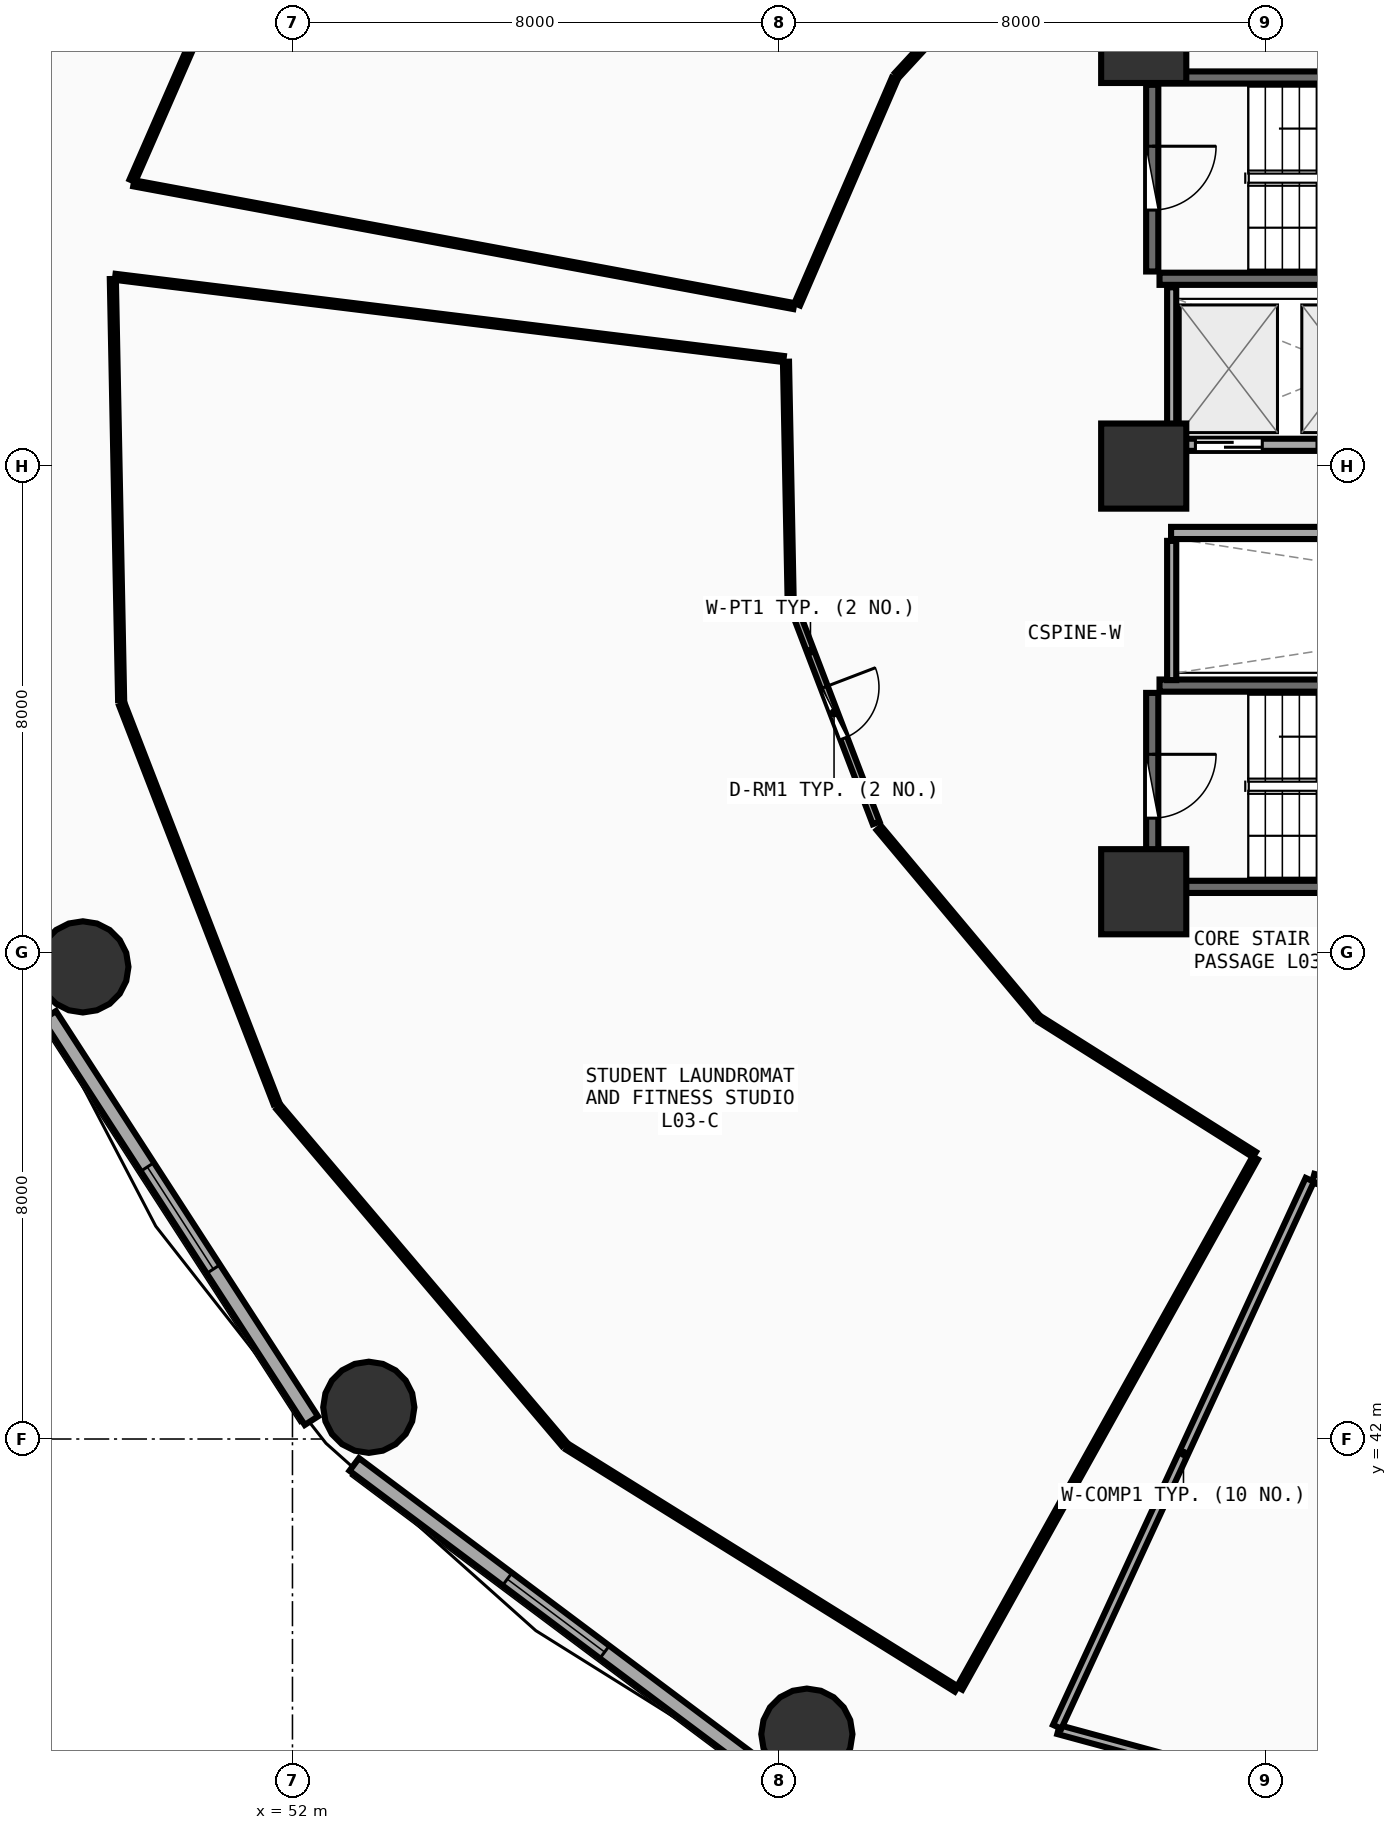
"""IFC4 building model, lengths in metres.
Left out: names, types, materials, properties, quantities, classifications, styles, units other than length and angle.
Written with IfcOpenShell. Run it as: python <this file> out.ifc"""

import sys

from ifc_helpers import new_model, si_unit, direction, frame, frame_2d, origin, origin_2d, place, context, subcontext, project, spatial, rectangle, circle, extrude, element, fill, save


model = new_model("IFC4")
c1 = context("Model", 3, precision=1e-05, world=origin(), true_north=direction((0.0, 1.0)))
c2 = subcontext(c1, "Body", "Model", "MODEL_VIEW")
j1 = project(units=[si_unit("LENGTHUNIT", "METRE"), si_unit("PLANEANGLEUNIT", "RADIAN")], contexts=[c1])
p1 = place(None, origin())
s1 = spatial("IfcSite", under=j1, at=p1, CompositionType="ELEMENT")
p2 = place(p1, origin())
s2 = spatial("IfcBuilding", under=s1, at=p2, CompositionType="ELEMENT")
p3 = place(p2, frame((0.0, 0.0, 13.5)))
s3 = spatial("IfcBuildingStorey", under=s2, at=p3, CompositionType="ELEMENT", Elevation=13.5)
for number, where, z_axis, x_axis in (
    (1, (66.0, 51.0, 0.0), (0.0, 0.0, 1.0), (1.0, 0.0, 0.0)),
    (2, (66.0, 65.0, 0.0), (0.0, 0.0, 1.0), (1.0, 0.0, 0.0)),
    (3, (66.0, 58.0, 0.0), (0.0, 0.0, 1.0), (1.0, 0.0, 0.0)),
):
    element("IfcColumn", number, at=place(p3, frame(where, z_axis=z_axis, x_axis=x_axis)), inside=s3, PredefinedType="PILASTER", context=c2, shape_type="SweptSolid", body=[
        extrude(rectangle(XDim=1.4, YDim=1.4, at=origin_2d()), origin(), (0.0, 0.0, 1.0), 4.5),
    ])
for number, where, z_axis, x_axis in (
    (4, (48.553, 49.764, 0.0), (0.0, 0.0, 1.0), (1.0, 0.0, 0.0)),
    (5, (53.256, 42.522, 0.0), (0.0, 0.0, 1.0), (1.0, 0.0, 0.0)),
    (6, (60.46, 37.146, 0.0), (0.0, 0.0, 1.0), (1.0, 0.0, 0.0)),
):
    element("IfcColumn", number, at=place(p3, frame(where, z_axis=z_axis, x_axis=x_axis)), inside=s3, PredefinedType="COLUMN", context=c2, shape_type="SweptSolid", body=[
        extrude(circle(Radius=0.75, at=origin_2d()), origin(), (0.0, 0.0, 1.0), 4.5),
    ])
p4 = place(p3, frame((48.001, 48.967, 0.0), z_axis=(0.0, 0.0, 1.0), x_axis=(0.543005114258, -0.839729388488, 0.0)))
e7 = element("IfcWall", 7, at=p4, inside=s3, PredefinedType="SOLIDWALL", context=c2, shape_type="SweptSolid", body=[
    extrude(rectangle(XDim=7.938, YDim=0.26, at=frame_2d((3.969, 0.0))), origin(), (0.0, 0.0, 1.0), 4.085),
])
p5 = place(p4, frame((2.969, 0.0, 0.85)))
e8 = element("IfcOpeningElement", 8, at=p5, cuts=e7, PredefinedType="OPENING", context=c2, shape_type="SweptSolid", body=[
    extrude(rectangle(XDim=2.0, YDim=1.75, at=frame_2d((1.0, 0.875))), frame((0.0, 0.14, 0.0), z_axis=(0.0, -1.0, 0.0), x_axis=(1.0, 0.0, 0.0)), (0.0, 0.0, 1.0), 0.28),
])
p6 = place(p3, frame((53.016, 41.582, 0.0), z_axis=(0.0, 0.0, 1.0), x_axis=(0.80030733173, -0.599590005569, 0.0)))
e9 = element("IfcWall", 9, at=p6, inside=s3, PredefinedType="SOLIDWALL", context=c2, shape_type="SweptSolid", body=[
    extrude(rectangle(XDim=8.291, YDim=0.26, at=frame_2d((4.145, 0.0))), origin(), (0.0, 0.0, 1.0), 4.085),
])
p7 = place(p6, frame((3.145, 0.0, 0.85)))
e10 = element("IfcOpeningElement", 10, at=p7, cuts=e9, PredefinedType="OPENING", context=c2, shape_type="SweptSolid", body=[
    extrude(rectangle(XDim=2.0, YDim=1.75, at=frame_2d((1.0, 0.875))), frame((0.0, 0.14, 0.0), z_axis=(0.0, -1.0, 0.0), x_axis=(1.0, 0.0, 0.0)), (0.0, 0.0, 1.0), 0.28),
])
for number, where, z_axis, x_axis in (
    (11, (66.26, 61.08, 0.0), (0.0, 0.0, 1.0), (1.0, 0.0, 0.0)),
    (12, (73.42, 64.39, 0.0), (0.0, 0.0, 1.0), (-1.0, 0.0, 0.0)),
):
    element("IfcWall", number, at=place(p3, frame(where, z_axis=z_axis, x_axis=x_axis)), inside=s3, PredefinedType="SHEAR", context=c2, shape_type="SweptSolid", body=[
        extrude(rectangle(XDim=7.16, YDim=0.2, at=frame_2d((3.58, 0.0))), origin(), (0.0, 0.0, 1.0), 4.1),
    ])
p8 = place(p3, frame((66.14, 64.27, 0.0), z_axis=(0.0, 0.0, 1.0), x_axis=(0.0, -1.0, 0.0)))
e13 = element("IfcWall", 13, at=p8, inside=s3, PredefinedType="SHEAR", context=c2, shape_type="SweptSolid", body=[
    extrude(rectangle(XDim=3.07, YDim=0.2, at=frame_2d((1.535, 0.0))), origin(), (0.0, 0.0, 1.0), 4.1),
])
p9 = place(p8, frame((1.01, 0.0, 0.0)))
e14 = element("IfcOpeningElement", 14, at=p9, cuts=e13, PredefinedType="OPENING", context=c2, shape_type="SweptSolid", body=[
    extrude(rectangle(XDim=1.05, YDim=2.1, at=frame_2d((0.525, 1.05))), frame((0.0, 0.11, 0.0), z_axis=(0.0, -1.0, 0.0), x_axis=(1.0, 0.0, 0.0)), (0.0, 0.0, 1.0), 0.22),
])
for number, where, z_axis, x_axis in (
    (15, (66.26, 51.08, 0.0), (0.0, 0.0, 1.0), (1.0, 0.0, 0.0)),
    (16, (73.42, 54.39, 0.0), (0.0, 0.0, 1.0), (-1.0, 0.0, 0.0)),
):
    element("IfcWall", number, at=place(p3, frame(where, z_axis=z_axis, x_axis=x_axis)), inside=s3, PredefinedType="SHEAR", context=c2, shape_type="SweptSolid", body=[
        extrude(rectangle(XDim=7.16, YDim=0.2, at=frame_2d((3.58, 0.0))), origin(), (0.0, 0.0, 1.0), 4.1),
    ])
p10 = place(p3, frame((66.14, 54.27, 0.0), z_axis=(0.0, 0.0, 1.0), x_axis=(0.0, -1.0, 0.0)))
e17 = element("IfcWall", 17, at=p10, inside=s3, PredefinedType="SHEAR", context=c2, shape_type="SweptSolid", body=[
    extrude(rectangle(XDim=3.07, YDim=0.2, at=frame_2d((1.535, 0.0))), origin(), (0.0, 0.0, 1.0), 4.1),
])
p11 = place(p10, frame((1.01, 0.0, 0.0)))
e18 = element("IfcOpeningElement", 18, at=p11, cuts=e17, PredefinedType="OPENING", context=c2, shape_type="SweptSolid", body=[
    extrude(rectangle(XDim=1.05, YDim=2.1, at=frame_2d((0.525, 1.05))), frame((0.0, 0.11, 0.0), z_axis=(0.0, -1.0, 0.0), x_axis=(1.0, 0.0, 0.0)), (0.0, 0.0, 1.0), 0.22),
])
p12 = place(p3, frame((66.45, 58.35, 0.0), z_axis=(0.0, 0.0, 1.0), x_axis=(1.0, 0.0, 0.0)))
e19 = element("IfcWall", 19, at=p12, inside=s3, PredefinedType="SOLIDWALL", context=c2, shape_type="SweptSolid", body=[
    extrude(rectangle(XDim=6.0, YDim=0.2, at=frame_2d((3.0, 0.0))), origin(), (0.0, 0.0, 1.0), 4.09),
])
p13 = place(p12, frame((0.4, 0.0, 0.0)))
e20 = element("IfcOpeningElement", 20, at=p13, cuts=e19, PredefinedType="OPENING", context=c2, shape_type="SweptSolid", body=[
    extrude(rectangle(XDim=1.1, YDim=2.1, at=frame_2d((0.55, 1.05))), frame((0.0, 0.11, 0.0), z_axis=(0.0, -1.0, 0.0), x_axis=(1.0, 0.0, 0.0)), (0.0, 0.0, 1.0), 0.22),
])
p14 = place(p12, frame((2.4, 0.0, 0.0)))
e21 = element("IfcOpeningElement", 21, at=p14, cuts=e19, PredefinedType="OPENING", context=c2, shape_type="SweptSolid", body=[
    extrude(rectangle(XDim=1.1, YDim=2.1, at=frame_2d((0.55, 1.05))), frame((0.0, 0.11, 0.0), z_axis=(0.0, -1.0, 0.0), x_axis=(1.0, 0.0, 0.0)), (0.0, 0.0, 1.0), 0.22),
])
p15 = place(p12, frame((4.4, 0.0, 0.0)))
e22 = element("IfcOpeningElement", 22, at=p15, cuts=e19, PredefinedType="OPENING", context=c2, shape_type="SweptSolid", body=[
    extrude(rectangle(XDim=1.1, YDim=2.1, at=frame_2d((0.55, 1.05))), frame((0.0, 0.11, 0.0), z_axis=(0.0, -1.0, 0.0), x_axis=(1.0, 0.0, 0.0)), (0.0, 0.0, 1.0), 0.22),
])
p16 = place(p3, frame((66.46, 58.48, 0.0), z_axis=(0.0, 0.0, 1.0), x_axis=(0.0, 1.0, 0.0)))
e23 = element("IfcWall", 23, at=p16, inside=s3, PredefinedType="PARTITIONING", context=c2, shape_type="SweptSolid", body=[
    extrude(rectangle(XDim=2.46, YDim=0.15, at=frame_2d((1.23, 0.0))), origin(), (0.0, 0.0, 1.0), 4.09),
])
p17 = place(p3, frame((66.45, 56.9, 0.0), z_axis=(0.0, 0.0, 1.0), x_axis=(1.0, 0.0, 0.0)))
e24 = element("IfcWall", 24, at=p17, inside=s3, PredefinedType="SOLIDWALL", context=c2, shape_type="SweptSolid", body=[
    extrude(rectangle(XDim=14.4, YDim=0.2, at=frame_2d((7.2, 0.0))), origin(), (0.0, 0.0, 1.0), 4.09),
])
p18 = place(p3, frame((66.46, 54.48, 0.0), z_axis=(0.0, 0.0, 1.0), x_axis=(0.0, 1.0, 0.0)))
e25 = element("IfcWall", 25, at=p18, inside=s3, PredefinedType="PARTITIONING", context=c2, shape_type="SweptSolid", body=[
    extrude(rectangle(XDim=2.29, YDim=0.15, at=frame_2d((1.145, 0.0))), origin(), (0.0, 0.0, 1.0), 4.09),
])
p19 = place(p3, frame((60.214, 55.753, 0.0), z_axis=(0.0, 0.0, 1.0), x_axis=(0.357236014767, -0.934014148583, 0.0)))
e26 = element("IfcWall", 26, at=p19, inside=s3, PredefinedType="PARTITIONING", context=c2, shape_type="SweptSolid", body=[
    extrude(rectangle(XDim=3.878, YDim=0.12, at=frame_2d((1.939, 0.0))), origin(), (0.0, 0.0, 1.0), 4.09),
])
p20 = place(p19, frame((1.489, 0.0, 0.0)))
e27 = element("IfcOpeningElement", 27, at=p20, cuts=e26, PredefinedType="OPENING", context=c2, shape_type="SweptSolid", body=[
    extrude(rectangle(XDim=0.9, YDim=2.08, at=frame_2d((0.45, 1.04))), frame((0.0, 0.07, 0.0), z_axis=(0.0, -1.0, 0.0), x_axis=(1.0, 0.0, 0.0)), (0.0, 0.0, 1.0), 0.14),
])
p21 = place(p3, frame((64.775, 67.495, 0.0), z_axis=(0.0, 0.0, 1.0), x_axis=(-0.678666938136, -0.734446177116, 0.0)))
e28 = element("IfcWall", 28, at=p21, inside=s3, PredefinedType="PARTITIONING", context=c2, shape_type="SweptSolid", body=[
    extrude(rectangle(XDim=4.167, YDim=0.1, at=frame_2d((2.083, 0.0))), origin(), (0.0, 0.0, 1.0), 3.485),
])
p22 = place(p3, frame((61.904, 64.368, 0.0), z_axis=(0.0, 0.0, 1.0), x_axis=(-0.396638629538, -0.917974834927, 0.0)))
e29 = element("IfcWall", 29, at=p22, inside=s3, PredefinedType="PARTITIONING", context=c2, shape_type="SweptSolid", body=[
    extrude(rectangle(XDim=4.039, YDim=0.1, at=frame_2d((2.02, 0.0))), origin(), (0.0, 0.0, 1.0), 4.09),
])
p23 = place(p3, frame((60.247, 60.631, 0.0), z_axis=(0.0, 0.0, 1.0), x_axis=(-0.98315361887, 0.18278118531, 0.0)))
e30 = element("IfcWall", 30, at=p23, inside=s3, PredefinedType="PARTITIONING", context=c2, shape_type="SweptSolid", body=[
    extrude(rectangle(XDim=11.042, YDim=0.1, at=frame_2d((5.521, 0.0))), origin(), (0.0, 0.0, 1.0), 3.785),
])
p24 = place(p3, frame((49.367, 62.694, 0.0), z_axis=(0.0, 0.0, 1.0), x_axis=(0.400764042692, 0.916181304156, 0.0)))
e31 = element("IfcWall", 31, at=p24, inside=s3, PredefinedType="PARTITIONING", context=c2, shape_type="SweptSolid", body=[
    extrude(rectangle(XDim=7.246, YDim=0.1, at=frame_2d((3.623, 0.0))), origin(), (0.0, 0.0, 1.0), 3.485),
])
p25 = place(p3, frame((60.117, 59.716, 0.0), z_axis=(0.0, 0.0, 1.0), x_axis=(0.01950509597, -0.999809757519, 0.0)))
e32 = element("IfcWall", 32, at=p25, inside=s3, PredefinedType="PARTITIONING", context=c2, shape_type="SweptSolid", body=[
    extrude(rectangle(XDim=3.868, YDim=0.1, at=frame_2d((1.934, 0.0))), origin(), (0.0, 0.0, 1.0), 3.485),
])
p26 = place(p3, frame((61.647, 52.044, 0.0), z_axis=(0.0, 0.0, 1.0), x_axis=(0.641987153188, -0.766715393834, 0.0)))
e33 = element("IfcWall", 33, at=p26, inside=s3, PredefinedType="PARTITIONING", context=c2, shape_type="SweptSolid", body=[
    extrude(rectangle(XDim=4.032, YDim=0.1, at=frame_2d((2.016, 0.0))), origin(), (0.0, 0.0, 1.0), 3.485),
])
p27 = place(p3, frame((64.295, 48.901, 0.0), z_axis=(0.0, 0.0, 1.0), x_axis=(0.845938242176, -0.533280873859, 0.0)))
e34 = element("IfcWall", 34, at=p27, inside=s3, PredefinedType="PARTITIONING", context=c2, shape_type="SweptSolid", body=[
    extrude(rectangle(XDim=4.167, YDim=0.1, at=frame_2d((2.084, 0.0))), origin(), (0.0, 0.0, 1.0), 3.485),
])
p28 = place(p3, frame((67.834, 46.622, 0.0), z_axis=(0.0, 0.0, 1.0), x_axis=(-0.486981509144, -0.873412279368, 0.0)))
e35 = element("IfcWall", 35, at=p28, inside=s3, PredefinedType="PARTITIONING", context=c2, shape_type="SweptSolid", body=[
    extrude(rectangle(XDim=9.984, YDim=0.1, at=frame_2d((4.992, 0.0))), origin(), (0.0, 0.0, 1.0), 3.485),
])
p29 = place(p3, frame((62.919, 37.888, 0.0), z_axis=(0.0, 0.0, 1.0), x_axis=(-0.848946333049, 0.52847906638, 0.0)))
e36 = element("IfcWall", 36, at=p29, inside=s3, PredefinedType="PARTITIONING", context=c2, shape_type="SweptSolid", body=[
    extrude(rectangle(XDim=7.527, YDim=0.1, at=frame_2d((3.763, 0.0))), origin(), (0.0, 0.0, 1.0), 3.485),
])
p30 = place(p3, frame((56.469, 41.917, 0.0), z_axis=(0.0, 0.0, 1.0), x_axis=(-0.646640152026, 0.762795197801, 0.0)))
e37 = element("IfcWall", 37, at=p30, inside=s3, PredefinedType="PARTITIONING", context=c2, shape_type="SweptSolid", body=[
    extrude(rectangle(XDim=7.258, YDim=0.1, at=frame_2d((3.629, 0.0))), origin(), (0.0, 0.0, 1.0), 3.485),
])
p31 = place(p3, frame((51.736, 47.521, 0.0), z_axis=(0.0, 0.0, 1.0), x_axis=(-0.361243648686, 0.932471461378, 0.0)))
e38 = element("IfcWall", 38, at=p31, inside=s3, PredefinedType="PARTITIONING", context=c2, shape_type="SweptSolid", body=[
    extrude(rectangle(XDim=7.026, YDim=0.1, at=frame_2d((3.513, 0.0))), origin(), (0.0, 0.0, 1.0), 3.485),
])
p32 = place(p3, frame((49.182, 54.15, 0.0), z_axis=(0.0, 0.0, 1.0), x_axis=(-0.019662782265, 0.999806668808, 0.0)))
e39 = element("IfcWall", 39, at=p32, inside=s3, PredefinedType="PARTITIONING", context=c2, shape_type="SweptSolid", body=[
    extrude(rectangle(XDim=6.928, YDim=0.1, at=frame_2d((3.464, 0.0))), origin(), (0.0, 0.0, 1.0), 3.485),
])
p33 = place(p3, frame((49.085, 61.112, 0.0), z_axis=(0.0, 0.0, 1.0), x_axis=(0.992530160612, -0.121999509325, 0.0)))
e40 = element("IfcWall", 40, at=p33, inside=s3, PredefinedType="PARTITIONING", context=c2, shape_type="SweptSolid", body=[
    extrude(rectangle(XDim=11.074, YDim=0.1, at=frame_2d((5.537, 0.0))), origin(), (0.0, 0.0, 1.0), 3.785),
])
p34 = place(p3, frame((68.787, 46.288, 0.0), z_axis=(0.0, 0.0, 1.0), x_axis=(0.964162769641, -0.265311427644, 0.0)))
e41 = element("IfcWall", 41, at=p34, inside=s3, PredefinedType="PARTITIONING", context=c2, shape_type="SweptSolid", body=[
    extrude(rectangle(XDim=2.344, YDim=0.15, at=frame_2d((1.172, 0.0))), origin(), (0.0, 0.0, 1.0), 4.09),
])
p35 = place(p3, frame((68.722, 36.1, 0.0), z_axis=(0.0, 0.0, 1.0), x_axis=(-0.964990226836, 0.262285840471, 0.0)))
e42 = element("IfcWall", 42, at=p35, inside=s3, PredefinedType="PARTITIONING", context=c2, shape_type="SweptSolid", body=[
    extrude(rectangle(XDim=4.273, YDim=0.15, at=frame_2d((2.137, 0.0))), origin(), (0.0, 0.0, 1.0), 3.485),
])
p36 = place(p3, frame((64.577, 37.267, 0.0), z_axis=(0.0, 0.0, 1.0), x_axis=(0.419273795464, 0.90785983744, 0.0)))
e43 = element("IfcWall", 43, at=p36, inside=s3, PredefinedType="PARTITIONING", context=c2, shape_type="SweptSolid", body=[
    extrude(rectangle(XDim=9.908, YDim=0.15, at=frame_2d((4.954, 0.0))), origin(), (0.0, 0.0, 1.0), 3.485),
])
p37 = place(p5, origin())
e44 = element("IfcWindow", 44, at=p37, inside=s3, PartitioningType="SINGLE_PANEL", PredefinedType="WINDOW", context=c2, shape_type="SweptSolid", body=[
    extrude(rectangle(XDim=2.0, YDim=1.75, at=frame_2d((1.0, 0.875))), frame((0.0, 0.03, 0.0), z_axis=(0.0, -1.0, 0.0), x_axis=(1.0, 0.0, 0.0)), (0.0, 0.0, 1.0), 0.06),
])
fill(e8, e44)
p38 = place(p7, origin())
e45 = element("IfcWindow", 45, at=p38, inside=s3, PartitioningType="SINGLE_PANEL", PredefinedType="WINDOW", context=c2, shape_type="SweptSolid", body=[
    extrude(rectangle(XDim=2.0, YDim=1.75, at=frame_2d((1.0, 0.875))), frame((0.0, 0.03, 0.0), z_axis=(0.0, -1.0, 0.0), x_axis=(1.0, 0.0, 0.0)), (0.0, 0.0, 1.0), 0.06),
])
fill(e10, e45)
p39 = place(p9, origin())
e46 = element("IfcDoor", 46, at=p39, inside=s3, OperationType="SINGLE_SWING_LEFT", PredefinedType="DOOR", context=c2, shape_type="SweptSolid", body=[
    extrude(rectangle(XDim=1.05, YDim=2.1, at=frame_2d((0.525, 1.05))), frame((0.0, 0.025, 0.0), z_axis=(0.0, -1.0, 0.0), x_axis=(1.0, 0.0, 0.0)), (0.0, 0.0, 1.0), 0.05),
])
fill(e14, e46)
p40 = place(p11, origin())
e47 = element("IfcDoor", 47, at=p40, inside=s3, OperationType="SINGLE_SWING_LEFT", PredefinedType="DOOR", context=c2, shape_type="SweptSolid", body=[
    extrude(rectangle(XDim=1.05, YDim=2.1, at=frame_2d((0.525, 1.05))), frame((0.0, 0.025, 0.0), z_axis=(0.0, -1.0, 0.0), x_axis=(1.0, 0.0, 0.0)), (0.0, 0.0, 1.0), 0.05),
])
fill(e18, e47)
p41 = place(p13, origin())
e48 = element("IfcDoor", 48, at=p41, inside=s3, OperationType="DOUBLE_DOOR_SLIDING", PredefinedType="DOOR", context=c2, shape_type="SweptSolid", body=[
    extrude(rectangle(XDim=1.1, YDim=2.1, at=frame_2d((0.55, 1.05))), frame((0.0, 0.025, 0.0), z_axis=(0.0, -1.0, 0.0), x_axis=(1.0, 0.0, 0.0)), (0.0, 0.0, 1.0), 0.05),
])
fill(e20, e48)
p42 = place(p14, origin())
e49 = element("IfcDoor", 49, at=p42, inside=s3, OperationType="DOUBLE_DOOR_SLIDING", PredefinedType="DOOR", context=c2, shape_type="SweptSolid", body=[
    extrude(rectangle(XDim=1.1, YDim=2.1, at=frame_2d((0.55, 1.05))), frame((0.0, 0.025, 0.0), z_axis=(0.0, -1.0, 0.0), x_axis=(1.0, 0.0, 0.0)), (0.0, 0.0, 1.0), 0.05),
])
fill(e21, e49)
p43 = place(p20, origin())
e50 = element("IfcDoor", 50, at=p43, inside=s3, OperationType="SINGLE_SWING_LEFT", PredefinedType="DOOR", context=c2, shape_type="SweptSolid", body=[
    extrude(rectangle(XDim=0.9, YDim=2.08, at=frame_2d((0.45, 1.04))), frame((0.0, 0.025, 0.0), z_axis=(0.0, -1.0, 0.0), x_axis=(1.0, 0.0, 0.0)), (0.0, 0.0, 1.0), 0.05),
])
fill(e27, e50)
save(model, sys.argv[1])
